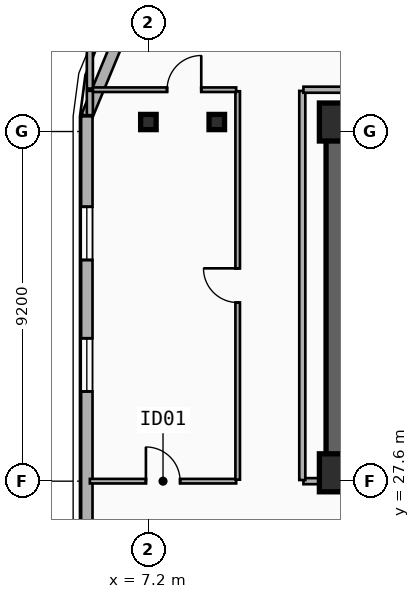
"""IFC4 building model, lengths in metres.
Left out: names, types, materials, properties, quantities, classifications, styles, units other than length and angle.
Written with IfcOpenShell. Run it as: python <this file> out.ifc"""

import sys

from ifc_helpers import new_model, si_unit, direction, frame, frame_2d, origin, origin_2d, place, context, subcontext, project, spatial, rectangle, i_section, extrude, element, fill, save


model = new_model("IFC4")
c1 = context("Model", 3, precision=1e-05, world=origin(), true_north=direction((0.0, 1.0)))
c2 = subcontext(c1, "Body", "Model", "MODEL_VIEW")
j1 = project(units=[si_unit("LENGTHUNIT", "METRE"), si_unit("PLANEANGLEUNIT", "RADIAN")], contexts=[c1])
p1 = place(None, origin())
s1 = spatial("IfcSite", under=j1, at=p1, CompositionType="ELEMENT")
p2 = place(p1, origin())
s2 = spatial("IfcBuilding", under=s1, at=p2, CompositionType="ELEMENT")
p3 = place(p2, frame((0.0, 0.0, 200.4)))
s3 = spatial("IfcBuildingStorey", under=s2, at=p3, CompositionType="ELEMENT", Elevation=200.4)
p4 = place(p3, frame((12.15, 37.05, 0.0), z_axis=(0.0, 0.0, 1.0), x_axis=(1.0, 0.0, 0.0)))
e1 = element("IfcWall", 1, at=p4, inside=s3, PredefinedType="SHEAR", context=c2, shape_type="SweptSolid", body=[
    extrude(rectangle(XDim=33.23, YDim=0.55, at=frame_2d((16.615, 0.0))), origin(), (0.0, 0.0, 1.0), 3.6),
])
p5 = place(p3, frame((21.18, 27.82, 0.0), z_axis=(0.0, 0.0, 1.0), x_axis=(-1.0, 0.0, 0.0)))
e2 = element("IfcWall", 2, at=p5, inside=s3, PredefinedType="SHEAR", context=c2, shape_type="SweptSolid", body=[
    extrude(rectangle(XDim=9.03, YDim=0.55, at=frame_2d((4.515, 0.0))), origin(), (0.0, 0.0, 1.0), 3.6),
])
p6 = place(p5, frame((2.68, 0.0, 0.0)))
e3 = element("IfcOpeningElement", 3, at=p6, cuts=e2, PredefinedType="OPENING", context=c2, shape_type="SweptSolid", body=[
    extrude(rectangle(XDim=1.1, YDim=2.15, at=frame_2d((0.55, 1.075))), frame((0.0, 0.285, 0.0), z_axis=(0.0, -1.0, 0.0), x_axis=(1.0, 0.0, 0.0)), (0.0, 0.0, 1.0), 0.57),
])
p7 = place(p3, frame((12.15, 28.095, 0.0), z_axis=(0.0, 0.0, 1.0), x_axis=(0.0, 1.0, 0.0)))
e4 = element("IfcWall", 4, at=p7, inside=s3, PredefinedType="SHEAR", context=c2, shape_type="SweptSolid", body=[
    extrude(rectangle(XDim=8.68, YDim=0.55, at=frame_2d((4.34, 0.0))), origin(), (0.0, 0.0, 1.0), 3.6),
])
for number, where, z_axis, x_axis in (
    (5, (12.2, 27.82, 0.0), (0.0, 0.0, 1.0), (1.0, 0.0, 0.0)),
    (6, (12.2, 37.05, 0.0), (0.0, 0.0, 1.0), (1.0, 0.0, 0.0)),
):
    element("IfcColumn", number, at=place(p3, frame(where, z_axis=z_axis, x_axis=x_axis)), inside=s3, PredefinedType="COLUMN", context=c2, shape_type="SweptSolid", body=[
        extrude(rectangle(XDim=1.0, YDim=1.0, at=origin_2d()), origin(), (0.0, 0.0, 1.0), 3.6),
    ])
for number, where, z_axis, x_axis in (
    (7, (9.0, 37.05, 0.0), (0.0, 0.0, 1.0), (1.0, 0.0, 0.0)),
    (8, (7.2, 37.05, 0.0), (0.0, 0.0, 1.0), (1.0, 0.0, 0.0)),
):
    element("IfcColumn", number, at=place(p3, frame(where, z_axis=z_axis, x_axis=x_axis)), inside=s3, PredefinedType="COLUMN", context=c2, shape_type="SweptSolid", body=[
        extrude(i_section(OverallWidth=0.408, OverallDepth=0.4, WebThickness=0.025, FlangeThickness=0.039, FilletRadius=0.015, at=origin_2d()), origin(), (0.0, 0.0, 1.0), 3.6),
    ])
p8 = place(p3, frame((5.58, 37.2, 0.0), z_axis=(0.0, 0.0, 1.0), x_axis=(0.382636798336, 0.92389884758, 0.0)))
e9 = element("IfcWall", 9, at=p8, inside=s3, PredefinedType="SOLIDWALL", context=c2, shape_type="SweptSolid", body=[
    extrude(rectangle(XDim=3.077, YDim=0.3, at=frame_2d((1.538, 0.0))), origin(), (0.0, 0.0, 1.0), 3.34),
])
p9 = place(p3, frame((5.58, 8.6, 0.0), z_axis=(0.0, 0.0, 1.0), x_axis=(0.0, 1.0, 0.0)))
e10 = element("IfcWall", 10, at=p9, inside=s3, PredefinedType="SOLIDWALL", context=c2, shape_type="SweptSolid", body=[
    extrude(rectangle(XDim=28.6, YDim=0.3, at=frame_2d((14.3, 0.0))), origin(), (0.0, 0.0, 1.0), 3.34),
])
p10 = place(p9, frame((21.36, 0.0, 0.34)))
e11 = element("IfcOpeningElement", 11, at=p10, cuts=e10, PredefinedType="OPENING", context=c2, shape_type="SweptSolid", body=[
    extrude(rectangle(XDim=1.4, YDim=2.1, at=frame_2d((0.7, 1.05))), frame((0.0, 0.16, 0.0), z_axis=(0.0, -1.0, 0.0), x_axis=(1.0, 0.0, 0.0)), (0.0, 0.0, 1.0), 0.32),
])
p11 = place(p9, frame((24.82, 0.0, 0.34)))
e12 = element("IfcOpeningElement", 12, at=p11, cuts=e10, PredefinedType="OPENING", context=c2, shape_type="SweptSolid", body=[
    extrude(rectangle(XDim=1.4, YDim=2.1, at=frame_2d((0.7, 1.05))), frame((0.0, 0.16, 0.0), z_axis=(0.0, -1.0, 0.0), x_axis=(1.0, 0.0, 0.0)), (0.0, 0.0, 1.0), 0.32),
])
p12 = place(p9, frame((4.797, 0.0, 0.34)))
e13 = element("IfcOpeningElement", 13, at=p12, cuts=e10, PredefinedType="OPENING", context=c2, shape_type="SweptSolid", body=[
    extrude(rectangle(XDim=1.4, YDim=2.1, at=frame_2d((0.7, 1.05))), frame((0.0, 0.16, 0.0), z_axis=(0.0, -1.0, 0.0), x_axis=(1.0, 0.0, 0.0)), (0.0, 0.0, 1.0), 0.32),
])
p13 = place(p9, frame((10.673, 0.0, 0.34)))
e14 = element("IfcOpeningElement", 14, at=p13, cuts=e10, PredefinedType="OPENING", context=c2, shape_type="SweptSolid", body=[
    extrude(rectangle(XDim=1.4, YDim=2.1, at=frame_2d((0.7, 1.05))), frame((0.0, 0.16, 0.0), z_axis=(0.0, -1.0, 0.0), x_axis=(1.0, 0.0, 0.0)), (0.0, 0.0, 1.0), 0.32),
])
p14 = place(p3, frame((5.66, 27.6, 0.0), z_axis=(0.0, 0.0, 1.0), x_axis=(1.0, 0.0, 0.0)))
e15 = element("IfcWall", 15, at=p14, inside=s3, PredefinedType="PARTITIONING", context=c2, shape_type="SweptSolid", body=[
    extrude(rectangle(XDim=3.85, YDim=0.12, at=frame_2d((1.925, 0.0))), origin(), (0.0, 0.0, 1.0), 2.67),
])
p15 = place(p14, frame((1.475, 0.0, 0.0)))
e16 = element("IfcOpeningElement", 16, at=p15, cuts=e15, PredefinedType="OPENING", context=c2, shape_type="SweptSolid", body=[
    extrude(rectangle(XDim=0.9, YDim=2.1, at=frame_2d((0.45, 1.05))), frame((0.0, 0.07, 0.0), z_axis=(0.0, -1.0, 0.0), x_axis=(1.0, 0.0, 0.0)), (0.0, 0.0, 1.0), 0.14),
])
p16 = place(p3, frame((9.55, 27.64, 0.0), z_axis=(0.0, 0.0, 1.0), x_axis=(0.0, 1.0, 0.0)))
e17 = element("IfcWall", 17, at=p16, inside=s3, PredefinedType="PARTITIONING", context=c2, shape_type="SweptSolid", body=[
    extrude(rectangle(XDim=10.22, YDim=0.12, at=frame_2d((5.11, 0.0))), origin(), (0.0, 0.0, 1.0), 2.82),
])
p17 = place(p16, frame((4.66, 0.0, 0.0)))
e18 = element("IfcOpeningElement", 18, at=p17, cuts=e17, PredefinedType="OPENING", context=c2, shape_type="SweptSolid", body=[
    extrude(rectangle(XDim=0.9, YDim=2.1, at=frame_2d((0.45, 1.05))), frame((0.0, 0.07, 0.0), z_axis=(0.0, -1.0, 0.0), x_axis=(1.0, 0.0, 0.0)), (0.0, 0.0, 1.0), 0.14),
])
p18 = place(p3, frame((5.66, 37.9, 0.0), z_axis=(0.0, 0.0, 1.0), x_axis=(1.0, 0.0, 0.0)))
e19 = element("IfcWall", 19, at=p18, inside=s3, PredefinedType="PARTITIONING", context=c2, shape_type="SweptSolid", body=[
    extrude(rectangle(XDim=3.85, YDim=0.12, at=frame_2d((1.925, 0.0))), origin(), (0.0, 0.0, 1.0), 3.34),
])
p19 = place(p18, frame((2.031, 0.0, 0.0)))
e20 = element("IfcOpeningElement", 20, at=p19, cuts=e19, PredefinedType="OPENING", context=c2, shape_type="SweptSolid", body=[
    extrude(rectangle(XDim=0.9, YDim=2.1, at=frame_2d((0.45, 1.05))), frame((0.0, 0.07, 0.0), z_axis=(0.0, -1.0, 0.0), x_axis=(1.0, 0.0, 0.0)), (0.0, 0.0, 1.0), 0.14),
])
p20 = place(p3, frame((11.28, 27.6, 0.0), z_axis=(0.0, 0.0, 1.0), x_axis=(1.0, 0.0, 0.0)))
e21 = element("IfcWall", 21, at=p20, inside=s3, PredefinedType="PARTITIONING", context=c2, shape_type="SweptSolid", body=[
    extrude(rectangle(XDim=0.84, YDim=0.16, at=frame_2d((0.42, 0.0))), origin(), (0.0, 0.0, 1.0), 2.41),
])
p21 = place(p3, frame((11.25, 27.63, 0.0), z_axis=(0.0, 0.0, 1.0), x_axis=(0.0, 1.0, 0.0)))
e22 = element("IfcWall", 22, at=p21, inside=s3, PredefinedType="PARTITIONING", context=c2, shape_type="SweptSolid", body=[
    extrude(rectangle(XDim=10.24, YDim=0.16, at=frame_2d((5.12, 0.0))), origin(), (0.0, 0.0, 1.0), 2.82),
])
p22 = place(p3, frame((11.28, 37.9, 0.0), z_axis=(0.0, 0.0, 1.0), x_axis=(1.0, 0.0, 0.0)))
e23 = element("IfcWall", 23, at=p22, inside=s3, PredefinedType="PARTITIONING", context=c2, shape_type="SweptSolid", body=[
    extrude(rectangle(XDim=35.04, YDim=0.16, at=frame_2d((17.52, 0.0))), origin(), (0.0, 0.0, 1.0), 3.34),
])
p23 = place(p3, frame((5.66, 37.93, 0.0), z_axis=(0.0, 0.0, 1.0), x_axis=(0.0, 1.0, 0.0)))
e24 = element("IfcWall", 24, at=p23, inside=s3, PredefinedType="PARTITIONING", context=c2, shape_type="SweptSolid", body=[
    extrude(rectangle(XDim=1.44, YDim=0.16, at=frame_2d((0.72, 0.0))), origin(), (0.0, 0.0, 1.0), 3.34),
])
p24 = place(p3, frame((5.66, 37.23, 0.0), z_axis=(0.0, 0.0, 1.0), x_axis=(0.0, 1.0, 0.0)))
e25 = element("IfcWall", 25, at=p24, inside=s3, PredefinedType="PARTITIONING", context=c2, shape_type="SweptSolid", body=[
    extrude(rectangle(XDim=0.64, YDim=0.16, at=frame_2d((0.32, 0.0))), origin(), (0.0, 0.0, 1.0), 3.34),
])
p25 = place(p10, origin())
e26 = element("IfcWindow", 26, at=p25, inside=s3, PartitioningType="SINGLE_PANEL", PredefinedType="WINDOW", context=c2, shape_type="SweptSolid", body=[
    extrude(rectangle(XDim=1.4, YDim=2.1, at=frame_2d((0.7, 1.05))), frame((0.0, 0.03, 0.0), z_axis=(0.0, -1.0, 0.0), x_axis=(1.0, 0.0, 0.0)), (0.0, 0.0, 1.0), 0.06),
])
fill(e11, e26)
p26 = place(p11, origin())
e27 = element("IfcWindow", 27, at=p26, inside=s3, PartitioningType="SINGLE_PANEL", PredefinedType="WINDOW", context=c2, shape_type="SweptSolid", body=[
    extrude(rectangle(XDim=1.4, YDim=2.1, at=frame_2d((0.7, 1.05))), frame((0.0, 0.03, 0.0), z_axis=(0.0, -1.0, 0.0), x_axis=(1.0, 0.0, 0.0)), (0.0, 0.0, 1.0), 0.06),
])
fill(e12, e27)
p27 = place(p15, origin())
e28 = element("IfcDoor", 28, at=p27, inside=s3, OperationType="SINGLE_SWING_LEFT", PredefinedType="DOOR", context=c2, shape_type="SweptSolid", body=[
    extrude(rectangle(XDim=0.9, YDim=2.1, at=frame_2d((0.45, 1.05))), frame((0.0, 0.025, 0.0), z_axis=(0.0, -1.0, 0.0), x_axis=(1.0, 0.0, 0.0)), (0.0, 0.0, 1.0), 0.05),
])
fill(e16, e28)
p28 = place(p17, origin())
e29 = element("IfcDoor", 29, at=p28, inside=s3, OperationType="SINGLE_SWING_RIGHT", PredefinedType="DOOR", context=c2, shape_type="SweptSolid", body=[
    extrude(rectangle(XDim=0.9, YDim=2.1, at=frame_2d((0.45, 1.05))), frame((0.0, 0.025, 0.0), z_axis=(0.0, -1.0, 0.0), x_axis=(1.0, 0.0, 0.0)), (0.0, 0.0, 1.0), 0.05),
])
fill(e18, e29)
p29 = place(p19, origin())
e30 = element("IfcDoor", 30, at=p29, inside=s3, OperationType="SINGLE_SWING_RIGHT", PredefinedType="DOOR", context=c2, shape_type="SweptSolid", body=[
    extrude(rectangle(XDim=0.9, YDim=2.1, at=frame_2d((0.45, 1.05))), frame((0.0, 0.025, 0.0), z_axis=(0.0, -1.0, 0.0), x_axis=(1.0, 0.0, 0.0)), (0.0, 0.0, 1.0), 0.05),
])
fill(e20, e30)
save(model, sys.argv[1])
